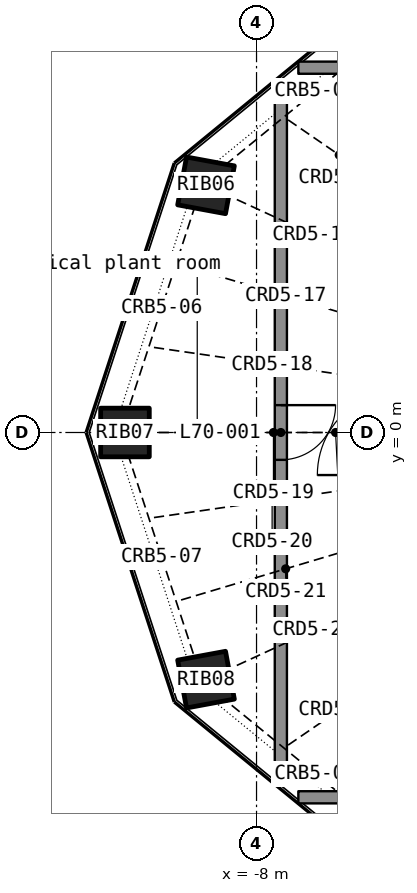
"""IFC4 building model, lengths in metres.
Left out: names, types, materials, properties, quantities, classifications, styles, units other than length and angle.
Written with IfcOpenShell. Run it as: python <this file> out.ifc"""

import sys

from ifc_helpers import new_model, si_unit, direction, frame, frame_2d, origin, origin_2d, place, context, subcontext, project, spatial, rectangle, hollow_rectangle, extrude, element, fill, save


model = new_model("IFC4")
c1 = context("Model", 3, precision=1e-05, world=origin(), true_north=direction((0.0, 1.0)))
c2 = subcontext(c1, "Body", "Model", "MODEL_VIEW")
j1 = project(units=[si_unit("LENGTHUNIT", "METRE"), si_unit("PLANEANGLEUNIT", "RADIAN")], contexts=[c1])
p1 = place(None, origin())
s1 = spatial("IfcSite", under=j1, at=p1, CompositionType="ELEMENT")
p2 = place(p1, origin())
s2 = spatial("IfcBuilding", under=s1, at=p2, CompositionType="ELEMENT")
p3 = place(p2, frame((0.0, 0.0, 288.2)))
s3 = spatial("IfcBuildingStorey", under=s2, at=p3, CompositionType="ELEMENT", Elevation=288.2)
p4 = place(p3, frame((-8.831, 4.065, 0.0), z_axis=(0.11908856, -0.054796873, 0.991370374), x_axis=(0.574592794, 0.818093207, -0.023803898)))
e1 = element("IfcColumn", 1, at=p4, inside=s3, PredefinedType="COLUMN", context=c2, shape_type="SweptSolid", body=[
    extrude(hollow_rectangle(XDim=0.8, YDim=0.8, WallThickness=0.025, at=origin_2d()), origin(), (0.0, 0.0, 1.0), 3.934),
])
p5 = place(p3, frame((-10.164, 0.0, 0.0), z_axis=(0.136914367, 0.0, 0.990582887), x_axis=(0.0, 1.0, 0.0)))
e2 = element("IfcColumn", 2, at=p5, inside=s3, PredefinedType="COLUMN", context=c2, shape_type="SweptSolid", body=[
    extrude(hollow_rectangle(XDim=0.8, YDim=0.8, WallThickness=0.025, at=origin_2d()), origin(), (0.0, 0.0, 1.0), 3.937),
])
p6 = place(p3, frame((-8.831, -4.065, 0.0), z_axis=(0.11908856, 0.054796873, 0.991370374), x_axis=(-0.574592794, 0.818093207, 0.023803898)))
e3 = element("IfcColumn", 3, at=p6, inside=s3, PredefinedType="COLUMN", context=c2, shape_type="SweptSolid", body=[
    extrude(hollow_rectangle(XDim=0.8, YDim=0.8, WallThickness=0.025, at=origin_2d()), origin(), (0.0, 0.0, 1.0), 3.934),
])
p7 = place(p3, frame((-7.6, 5.755, 0.0), z_axis=(0.0, 0.0, 1.0), x_axis=(0.0, -1.0, 0.0)))
e4 = element("IfcWall", 4, at=p7, inside=s3, PredefinedType="PARTITIONING", context=c2, shape_type="SweptSolid", body=[
    extrude(rectangle(XDim=11.511, YDim=0.2, at=frame_2d((5.755, 0.0))), origin(), (0.0, 0.0, 1.0), 2.9),
])
p8 = place(p7, frame((5.305, 0.0, 0.0)))
e5 = element("IfcOpeningElement", 5, at=p8, cuts=e4, PredefinedType="OPENING", context=c2, shape_type="SweptSolid", body=[
    extrude(rectangle(XDim=0.9, YDim=2.1, at=frame_2d((0.45, 1.05))), frame((0.0, 0.11, 0.0), z_axis=(0.0, -1.0, 0.0), x_axis=(1.0, 0.0, 0.0)), (0.0, 0.0, 1.0), 0.22),
])
p9 = place(p3, frame((-7.312, -6.0, 0.0), z_axis=(0.0, 0.0, 1.0), x_axis=(1.0, 0.0, 0.0)))
e6 = element("IfcWall", 6, at=p9, inside=s3, PredefinedType="PARTITIONING", context=c2, shape_type="SweptSolid", body=[
    extrude(rectangle(XDim=1.5, YDim=0.2, at=frame_2d((0.75, 0.0))), origin(), (0.0, 0.0, 1.0), 2.9),
])
p10 = place(p3, frame((-5.813, 6.0, 0.0), z_axis=(0.0, 0.0, 1.0), x_axis=(-1.0, 0.0, 0.0)))
e7 = element("IfcWall", 7, at=p10, inside=s3, PredefinedType="PARTITIONING", context=c2, shape_type="SweptSolid", body=[
    extrude(rectangle(XDim=1.499, YDim=0.2, at=frame_2d((0.75, 0.0))), origin(), (0.0, 0.0, 1.0), 2.9),
])
p11 = place(p8, origin())
e8 = element("IfcDoor", 8, at=p11, inside=s3, OperationType="SINGLE_SWING_LEFT", PredefinedType="DOOR", context=c2, shape_type="SweptSolid", body=[
    extrude(rectangle(XDim=0.9, YDim=2.1, at=frame_2d((0.45, 1.05))), frame((0.0, 0.025, 0.0), z_axis=(0.0, -1.0, 0.0), x_axis=(1.0, 0.0, 0.0)), (0.0, 0.0, 1.0), 0.05),
])
fill(e5, e8)
save(model, sys.argv[1])
